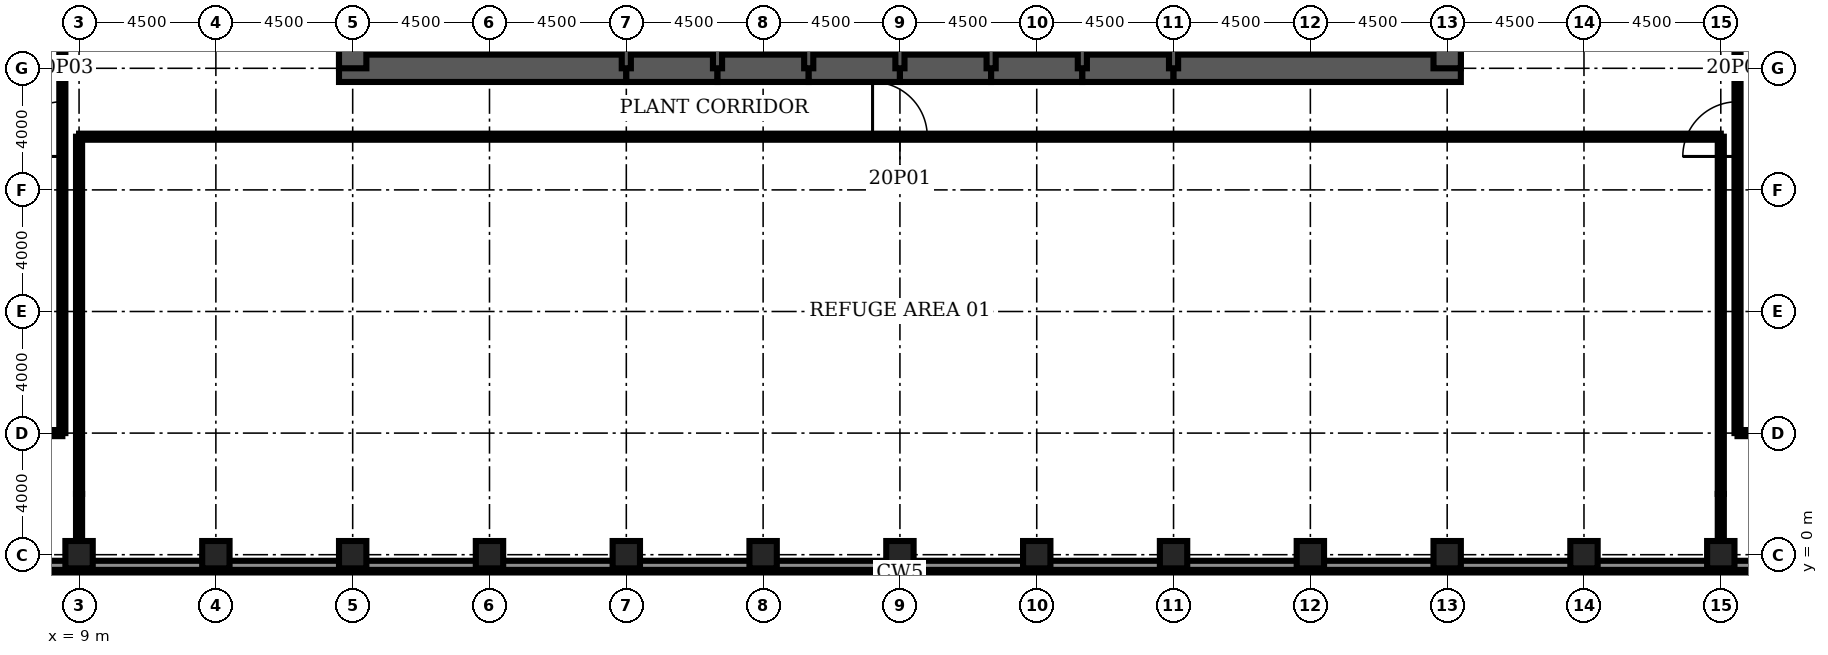
"""IFC4 building model, lengths in metres.
Left out: names, types, materials, properties, quantities, classifications, styles, units other than length and angle.
Written with IfcOpenShell. Run it as: python <this file> out.ifc"""

import sys

from ifc_helpers import new_model, si_unit, direction, frame, frame_2d, origin, origin_2d, place, context, subcontext, project, spatial, rectangle, hollow_rectangle, extrude, element, fill, save


model = new_model("IFC4")
c1 = context("Model", 3, precision=1e-05, world=origin(), true_north=direction((0.0, 1.0)))
c2 = subcontext(c1, "Body", "Model", "MODEL_VIEW")
j1 = project(units=[si_unit("LENGTHUNIT", "METRE"), si_unit("PLANEANGLEUNIT", "RADIAN")], contexts=[c1])
p1 = place(None, origin())
s1 = spatial("IfcSite", under=j1, at=p1, CompositionType="ELEMENT")
p2 = place(p1, origin())
s2 = spatial("IfcBuilding", under=s1, at=p2, CompositionType="ELEMENT")
p3 = place(p2, frame((0.0, 0.0, 95.0)))
s3 = spatial("IfcBuildingStorey", under=s2, at=p3, CompositionType="ELEMENT", Elevation=95.0)
for number, where, z_axis, x_axis in (
    (1, (9.0, 0.056, 0.155), (0.0, 0.342, 0.94), (0.0, -0.94, 0.342)),
    (2, (13.5, 0.056, 0.155), (0.0, 0.342, 0.94), (0.0, -0.94, 0.342)),
    (3, (18.0, 0.056, 0.155), (0.0, 0.342, 0.94), (0.0, -0.94, 0.342)),
    (4, (22.5, 0.056, 0.155), (0.0, 0.342, 0.94), (0.0, -0.94, 0.342)),
    (5, (27.0, 0.056, 0.155), (0.0, 0.342, 0.94), (0.0, -0.94, 0.342)),
    (6, (31.5, 0.056, 0.155), (0.0, 0.342, 0.94), (0.0, -0.94, 0.342)),
    (7, (36.0, 0.056, 0.155), (0.0, 0.342, 0.94), (0.0, -0.94, 0.342)),
    (8, (40.5, 0.056, 0.155), (0.0, 0.342, 0.94), (0.0, -0.94, 0.342)),
    (9, (45.0, 0.056, 0.155), (0.0, 0.342, 0.94), (0.0, -0.94, 0.342)),
    (10, (49.5, 0.056, 0.155), (0.0, 0.342, 0.94), (0.0, -0.94, 0.342)),
    (11, (54.0, 0.056, 0.155), (0.0, 0.342, 0.94), (0.0, -0.94, 0.342)),
    (12, (58.5, 0.056, 0.155), (0.0, 0.342, 0.94), (0.0, -0.94, 0.342)),
    (13, (63.0, 0.056, 0.155), (0.0, 0.342, 0.94), (0.0, -0.94, 0.342)),
):
    element("IfcColumn", number, at=place(p3, frame(where, z_axis=z_axis, x_axis=x_axis)), inside=s3, PredefinedType="USERDEFINED", context=c2, shape_type="SweptSolid", body=[
        extrude(hollow_rectangle(XDim=0.9, YDim=0.9, WallThickness=0.11, at=origin_2d()), origin(), (0.0, 0.0, 1.0), 5.522),
    ])
p4 = place(p3, frame((17.55, 16.0, 0.0), z_axis=(0.0, 0.0, 1.0), x_axis=(1.0, 0.0, 0.0)))
e14 = element("IfcWall", 14, at=p4, inside=s3, PredefinedType="SHEAR", context=c2, shape_type="SweptSolid", body=[
    extrude(rectangle(XDim=9.45, YDim=0.9, at=frame_2d((4.725, 0.0))), origin(), (0.0, 0.0, 1.0), 5.5),
])
for number, where, z_axis, x_axis in (
    (15, (27.0, 16.0, 0.0), (0.0, 0.0, 1.0), (1.0, 0.0, 0.0)),
    (16, (30.0, 16.0, 0.0), (0.0, 0.0, 1.0), (1.0, 0.0, 0.0)),
    (17, (33.0, 16.0, 0.0), (0.0, 0.0, 1.0), (1.0, 0.0, 0.0)),
    (18, (36.0, 16.0, 0.0), (0.0, 0.0, 1.0), (1.0, 0.0, 0.0)),
    (19, (39.0, 16.0, 0.0), (0.0, 0.0, 1.0), (1.0, 0.0, 0.0)),
    (20, (42.0, 16.0, 0.0), (0.0, 0.0, 1.0), (1.0, 0.0, 0.0)),
):
    element("IfcWall", number, at=place(p3, frame(where, z_axis=z_axis, x_axis=x_axis)), inside=s3, PredefinedType="SHEAR", context=c2, shape_type="SweptSolid", body=[
        extrude(rectangle(XDim=3.0, YDim=0.9, at=frame_2d((1.5, 0.0))), origin(), (0.0, 0.0, 1.0), 5.5),
    ])
p5 = place(p3, frame((45.0, 16.0, 0.0), z_axis=(0.0, 0.0, 1.0), x_axis=(1.0, 0.0, 0.0)))
e21 = element("IfcWall", 21, at=p5, inside=s3, PredefinedType="SHEAR", context=c2, shape_type="SweptSolid", body=[
    extrude(rectangle(XDim=9.45, YDim=0.9, at=frame_2d((4.725, 0.0))), origin(), (0.0, 0.0, 1.0), 5.5),
])
for number, where, z_axis, x_axis in (
    (22, (18.0, 19.2, 0.0), (0.0, 0.0, 1.0), (0.0, -1.0, 0.0)),
    (23, (54.0, 16.0, 0.0), (0.0, 0.0, 1.0), (0.0, 1.0, 0.0)),
):
    element("IfcWall", number, at=place(p3, frame(where, z_axis=z_axis, x_axis=x_axis)), inside=s3, PredefinedType="SHEAR", context=c2, shape_type="SweptSolid", body=[
        extrude(rectangle(XDim=3.2, YDim=0.9, at=frame_2d((1.6, 0.0))), origin(), (0.0, 0.0, 1.0), 5.5),
    ])
for number, where, z_axis, x_axis in (
    (24, (27.0, 16.0, 0.0), (0.0, 0.0, 1.0), (0.0, 1.0, 0.0)),
    (25, (30.0, 16.0, 0.0), (0.0, 0.0, 1.0), (0.0, 1.0, 0.0)),
    (26, (33.0, 16.0, 0.0), (0.0, 0.0, 1.0), (0.0, 1.0, 0.0)),
    (27, (36.0, 16.0, 0.0), (0.0, 0.0, 1.0), (0.0, 1.0, 0.0)),
    (28, (39.0, 16.0, 0.0), (0.0, 0.0, 1.0), (0.0, 1.0, 0.0)),
    (29, (42.0, 16.0, 0.0), (0.0, 0.0, 1.0), (0.0, 1.0, 0.0)),
    (30, (45.0, 16.0, 0.0), (0.0, 0.0, 1.0), (0.0, 1.0, 0.0)),
):
    element("IfcWall", number, at=place(p3, frame(where, z_axis=z_axis, x_axis=x_axis)), inside=s3, PredefinedType="SOLIDWALL", context=c2, shape_type="SweptSolid", body=[
        extrude(rectangle(XDim=3.2, YDim=0.3, at=frame_2d((1.6, 0.0))), origin(), (0.0, 0.0, 1.0), 5.5),
    ])
for number, where, z_axis, x_axis in (
    (31, (4.5, 4.0, 0.0), (0.0, 0.0, 1.0), (1.0, 0.0, 0.0)),
    (32, (63.55, 4.0, 0.0), (0.0, 0.0, 1.0), (1.0, 0.0, 0.0)),
):
    element("IfcWall", number, at=place(p3, frame(where, z_axis=z_axis, x_axis=x_axis)), inside=s3, PredefinedType="PARTITIONING", context=c2, shape_type="SweptSolid", body=[
        extrude(rectangle(XDim=3.95, YDim=0.2, at=frame_2d((1.975, 0.0))), origin(), (0.0, 0.0, 1.0), 5.34),
    ])
p6 = place(p3, frame((9.0, 13.75, 0.0), z_axis=(0.0, 0.0, 1.0), x_axis=(1.0, 0.0, 0.0)))
e33 = element("IfcWall", 33, at=p6, inside=s3, PredefinedType="PARTITIONING", context=c2, shape_type="SweptSolid", body=[
    extrude(rectangle(XDim=54.0, YDim=0.2, at=frame_2d((27.0, 0.0))), origin(), (0.0, 0.0, 1.0), 5.34),
])
p7 = place(p6, frame((26.1, 0.0, 0.0)))
e34 = element("IfcOpeningElement", 34, at=p7, cuts=e33, PredefinedType="OPENING", context=c2, shape_type="SweptSolid", body=[
    extrude(rectangle(XDim=1.8, YDim=2.1, at=frame_2d((0.9, 1.05))), frame((0.0, 0.11, 0.0), z_axis=(0.0, -1.0, 0.0), x_axis=(1.0, 0.0, 0.0)), (0.0, 0.0, 1.0), 0.22),
])
p8 = place(p3, frame((8.45, 4.0, 0.0), z_axis=(0.0, 0.0, 1.0), x_axis=(0.0, 1.0, 0.0)))
e35 = element("IfcWall", 35, at=p8, inside=s3, PredefinedType="PARTITIONING", context=c2, shape_type="SweptSolid", body=[
    extrude(rectangle(XDim=38.0, YDim=0.2, at=frame_2d((19.0, 0.0))), origin(), (0.0, 0.0, 1.0), 5.34),
])
p9 = place(p8, frame((9.1, 0.0, 0.0)))
e36 = element("IfcOpeningElement", 36, at=p9, cuts=e35, PredefinedType="OPENING", context=c2, shape_type="SweptSolid", body=[
    extrude(rectangle(XDim=1.8, YDim=2.1, at=frame_2d((0.9, 1.05))), frame((0.0, 0.11, 0.0), z_axis=(0.0, -1.0, 0.0), x_axis=(1.0, 0.0, 0.0)), (0.0, 0.0, 1.0), 0.22),
])
p10 = place(p8, frame((25.1, 0.0, 0.0)))
e37 = element("IfcOpeningElement", 37, at=p10, cuts=e35, PredefinedType="OPENING", context=c2, shape_type="SweptSolid", body=[
    extrude(rectangle(XDim=1.8, YDim=2.1, at=frame_2d((0.9, 1.05))), frame((0.0, 0.11, 0.0), z_axis=(0.0, -1.0, 0.0), x_axis=(1.0, 0.0, 0.0)), (0.0, 0.0, 1.0), 0.22),
])
p11 = place(p8, frame((34.5, 0.0, 0.0)))
e38 = element("IfcOpeningElement", 38, at=p11, cuts=e35, PredefinedType="OPENING", context=c2, shape_type="SweptSolid", body=[
    extrude(rectangle(XDim=1.0, YDim=2.1, at=frame_2d((0.5, 1.05))), frame((0.0, 0.11, 0.0), z_axis=(0.0, -1.0, 0.0), x_axis=(1.0, 0.0, 0.0)), (0.0, 0.0, 1.0), 0.22),
])
p12 = place(p3, frame((9.0, 0.45, 0.0), z_axis=(0.0, 0.0, 1.0), x_axis=(0.0, 1.0, 0.0)))
e39 = element("IfcWall", 39, at=p12, inside=s3, PredefinedType="PARTITIONING", context=c2, shape_type="SweptSolid", body=[
    extrude(rectangle(XDim=1.55, YDim=0.2, at=frame_2d((0.775, 0.0))), origin(), (0.0, 0.0, 1.0), 4.726),
])
p13 = place(p3, frame((9.0, 2.0, 0.0), z_axis=(0.0, 0.0, 1.0), x_axis=(0.0, 1.0, 0.0)))
e40 = element("IfcWall", 40, at=p13, inside=s3, PredefinedType="PARTITIONING", context=c2, shape_type="SweptSolid", body=[
    extrude(rectangle(XDim=11.75, YDim=0.2, at=frame_2d((5.875, 0.0))), origin(), (0.0, 0.0, 1.0), 5.25),
])
p14 = place(p3, frame((63.0, 0.45, 0.0), z_axis=(0.0, 0.0, 1.0), x_axis=(0.0, 1.0, 0.0)))
e41 = element("IfcWall", 41, at=p14, inside=s3, PredefinedType="PARTITIONING", context=c2, shape_type="SweptSolid", body=[
    extrude(rectangle(XDim=1.55, YDim=0.2, at=frame_2d((0.775, 0.0))), origin(), (0.0, 0.0, 1.0), 4.726),
])
p15 = place(p3, frame((63.0, 2.0, 0.0), z_axis=(0.0, 0.0, 1.0), x_axis=(0.0, 1.0, 0.0)))
e42 = element("IfcWall", 42, at=p15, inside=s3, PredefinedType="PARTITIONING", context=c2, shape_type="SweptSolid", body=[
    extrude(rectangle(XDim=11.75, YDim=0.2, at=frame_2d((5.875, 0.0))), origin(), (0.0, 0.0, 1.0), 5.25),
])
p16 = place(p3, frame((63.55, 4.0, 0.0), z_axis=(0.0, 0.0, 1.0), x_axis=(0.0, 1.0, 0.0)))
e43 = element("IfcWall", 43, at=p16, inside=s3, PredefinedType="PARTITIONING", context=c2, shape_type="SweptSolid", body=[
    extrude(rectangle(XDim=38.0, YDim=0.2, at=frame_2d((19.0, 0.0))), origin(), (0.0, 0.0, 1.0), 5.34),
])
p17 = place(p16, frame((9.1, 0.0, 0.0)))
e44 = element("IfcOpeningElement", 44, at=p17, cuts=e43, PredefinedType="OPENING", context=c2, shape_type="SweptSolid", body=[
    extrude(rectangle(XDim=1.8, YDim=2.1, at=frame_2d((0.9, 1.05))), frame((0.0, 0.11, 0.0), z_axis=(0.0, -1.0, 0.0), x_axis=(1.0, 0.0, 0.0)), (0.0, 0.0, 1.0), 0.22),
])
p18 = place(p16, frame((21.5, 0.0, 0.0)))
e45 = element("IfcOpeningElement", 45, at=p18, cuts=e43, PredefinedType="OPENING", context=c2, shape_type="SweptSolid", body=[
    extrude(rectangle(XDim=1.0, YDim=2.1, at=frame_2d((0.5, 1.05))), frame((0.0, 0.11, 0.0), z_axis=(0.0, -1.0, 0.0), x_axis=(1.0, 0.0, 0.0)), (0.0, 0.0, 1.0), 0.22),
])
p19 = place(p16, frame((27.1, 0.0, 0.0)))
e46 = element("IfcOpeningElement", 46, at=p19, cuts=e43, PredefinedType="OPENING", context=c2, shape_type="SweptSolid", body=[
    extrude(rectangle(XDim=1.8, YDim=2.1, at=frame_2d((0.9, 1.05))), frame((0.0, 0.11, 0.0), z_axis=(0.0, -1.0, 0.0), x_axis=(1.0, 0.0, 0.0)), (0.0, 0.0, 1.0), 0.22),
])
p20 = place(p16, frame((34.5, 0.0, 0.0)))
e47 = element("IfcOpeningElement", 47, at=p20, cuts=e43, PredefinedType="OPENING", context=c2, shape_type="SweptSolid", body=[
    extrude(rectangle(XDim=1.0, YDim=2.1, at=frame_2d((0.5, 1.05))), frame((0.0, 0.11, 0.0), z_axis=(0.0, -1.0, 0.0), x_axis=(1.0, 0.0, 0.0)), (0.0, 0.0, 1.0), 0.22),
])
p21 = place(p3, frame((4.15, -0.35, 5.5), z_axis=(0.0, 0.0, 1.0), x_axis=(1.0, 0.0, 0.0)))
e48 = element("IfcWall", 48, at=p21, inside=s3, PredefinedType="PARAPET", context=c2, shape_type="SweptSolid", body=[
    extrude(rectangle(XDim=63.7, YDim=0.3, at=frame_2d((31.85, 0.0))), origin(), (0.0, 0.0, 1.0), 1.1),
])
p22 = place(p7, origin())
e49 = element("IfcDoor", 49, at=p22, inside=s3, OperationType="SINGLE_SWING_LEFT", PredefinedType="DOOR", context=c2, shape_type="SweptSolid", body=[
    extrude(rectangle(XDim=1.8, YDim=2.1, at=frame_2d((0.9, 1.05))), frame((0.0, 0.025, 0.0), z_axis=(0.0, -1.0, 0.0), x_axis=(1.0, 0.0, 0.0)), (0.0, 0.0, 1.0), 0.05),
])
fill(e34, e49)
p23 = place(p17, origin())
e50 = element("IfcDoor", 50, at=p23, inside=s3, OperationType="SINGLE_SWING_LEFT", PredefinedType="DOOR", context=c2, shape_type="SweptSolid", body=[
    extrude(rectangle(XDim=1.8, YDim=2.1, at=frame_2d((0.9, 1.05))), frame((0.0, 0.025, 0.0), z_axis=(0.0, -1.0, 0.0), x_axis=(1.0, 0.0, 0.0)), (0.0, 0.0, 1.0), 0.05),
])
fill(e44, e50)
p24 = place(p9, origin())
e51 = element("IfcDoor", 51, at=p24, inside=s3, OperationType="SINGLE_SWING_LEFT", PredefinedType="DOOR", context=c2, shape_type="SweptSolid", body=[
    extrude(rectangle(XDim=1.8, YDim=2.1, at=frame_2d((0.9, 1.05))), frame((0.0, 0.025, 0.0), z_axis=(0.0, -1.0, 0.0), x_axis=(1.0, 0.0, 0.0)), (0.0, 0.0, 1.0), 0.05),
])
fill(e36, e51)
save(model, sys.argv[1])
